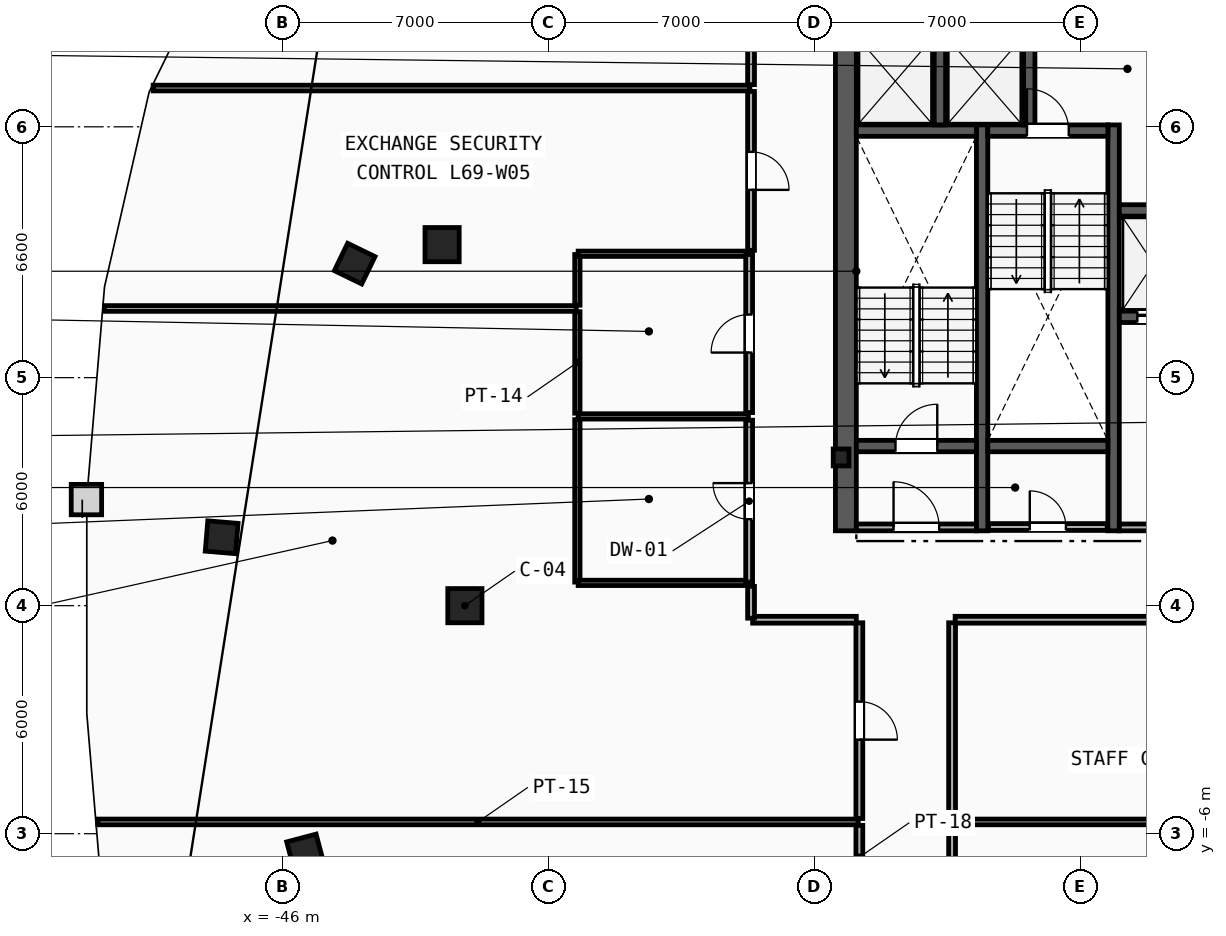
"""IFC4 building model, lengths in metres.
Left out: names, types, materials, properties, quantities, classifications, styles, units other than length and angle.
Written with IfcOpenShell. Run it as: python <this file> out.ifc"""

import sys

from ifc_helpers import new_model, si_unit, direction, frame, frame_2d, origin, origin_2d, place, context, subcontext, project, spatial, rectangle, i_section, extrude, element, fill, save


model = new_model("IFC4")
c1 = context("Model", 3, precision=1e-05, world=origin(), true_north=direction((0.0, 1.0)))
c2 = subcontext(c1, "Body", "Model", "MODEL_VIEW")
j1 = project(units=[si_unit("LENGTHUNIT", "METRE"), si_unit("PLANEANGLEUNIT", "RADIAN")], contexts=[c1])
p1 = place(None, origin())
s1 = spatial("IfcSite", under=j1, at=p1, CompositionType="ELEMENT")
p2 = place(p1, origin())
s2 = spatial("IfcBuilding", under=s1, at=p2, CompositionType="ELEMENT")
p3 = place(p2, frame((0.0, 0.0, 261.2)))
s3 = spatial("IfcBuildingStorey", under=s2, at=p3, CompositionType="ELEMENT", Elevation=261.2)
p4 = place(p3, frame((-31.3, 3.9, 0.0), z_axis=(0.0, 0.0, 1.0), x_axis=(1.0, 0.0, 0.0)))
e1 = element("IfcColumn", 1, at=p4, inside=s3, PredefinedType="COLUMN", context=c2, shape_type="SweptSolid", body=[
    extrude(i_section(OverallWidth=0.416, OverallDepth=0.446, WebThickness=0.039, FlangeThickness=0.063, FilletRadius=0.018, at=origin_2d()), origin(), (0.0, 0.0, 1.0), 3.6),
])
for number, where, z_axis, x_axis in (
    (2, (-41.2, 0.0, 0.0), (0.0, 0.0, 1.0), (1.0, 0.0, 0.0)),
    (3, (-41.8, 9.5, 0.0), (0.0, 0.0, 1.0), (1.0, 0.0, 0.0)),
):
    element("IfcColumn", number, at=place(p3, frame(where, z_axis=z_axis, x_axis=x_axis)), inside=s3, PredefinedType="COLUMN", context=c2, shape_type="SweptSolid", body=[
        extrude(rectangle(XDim=0.9, YDim=0.9, at=origin_2d()), origin(), (0.0, 0.0, 1.0), 3.6),
    ])
for number, where, z_axis, x_axis in (
    (4, (-44.1, 9.0, 0.0), (0.0, 0.0, 1.0), (-0.437, -0.899, 0.0)),
    (5, (-47.6, 1.8, 0.0), (0.0, 0.0, 1.0), (-0.084, -0.997, 0.0)),
    (6, (-45.4, -6.5, 0.0), (0.0, 0.0, 1.0), (0.256, -0.967, 0.0)),
):
    element("IfcColumn", number, at=place(p3, frame(where, z_axis=z_axis, x_axis=x_axis)), inside=s3, PredefinedType="COLUMN", context=c2, shape_type="SweptSolid", body=[
        extrude(rectangle(XDim=0.8, YDim=0.8, at=origin_2d()), origin(), (0.0, 0.0, 1.0), 3.6),
    ])
p5 = place(p3, frame((-31.175, 1.97, 0.0), z_axis=(0.0, 0.0, 1.0), x_axis=(0.0, 1.0, 0.0)))
e7 = element("IfcWall", 7, at=p5, inside=s3, PredefinedType="SHEAR", context=c2, shape_type="SweptSolid", body=[
    extrude(rectangle(XDim=13.33, YDim=0.55, at=frame_2d((6.665, 0.0))), origin(), (0.0, 0.0, 1.0), 3.34),
])
for number, where, z_axis, x_axis in (
    (8, (-27.59, 1.97, 0.0), (0.0, 0.0, 1.0), (0.0, 1.0, 0.0)),
    (9, (-24.13, 1.97, 0.0), (0.0, 0.0, 1.0), (0.0, 1.0, 0.0)),
):
    element("IfcWall", number, at=place(p3, frame(where, z_axis=z_axis, x_axis=x_axis)), inside=s3, PredefinedType="SHEAR", context=c2, shape_type="SweptSolid", body=[
        extrude(rectangle(XDim=10.68, YDim=0.3, at=frame_2d((5.34, 0.0))), origin(), (0.0, 0.0, 1.0), 3.34),
    ])
p6 = place(p3, frame((-30.9, 4.2, 0.0), z_axis=(0.0, 0.0, 1.0), x_axis=(1.0, 0.0, 0.0)))
e10 = element("IfcWall", 10, at=p6, inside=s3, PredefinedType="SHEAR", context=c2, shape_type="SweptSolid", body=[
    extrude(rectangle(XDim=3.16, YDim=0.3, at=frame_2d((1.58, 0.0))), origin(), (0.0, 0.0, 1.0), 3.34),
])
p7 = place(p6, frame((1.03, 0.0, 0.0)))
e11 = element("IfcOpeningElement", 11, at=p7, cuts=e10, PredefinedType="OPENING", context=c2, shape_type="SweptSolid", body=[
    extrude(rectangle(XDim=1.1, YDim=2.15, at=frame_2d((0.55, 1.075))), frame((0.0, 0.16, 0.0), z_axis=(0.0, -1.0, 0.0), x_axis=(1.0, 0.0, 0.0)), (0.0, 0.0, 1.0), 0.32),
])
p8 = place(p3, frame((-30.9, 12.5, 0.0), z_axis=(0.0, 0.0, 1.0), x_axis=(1.0, 0.0, 0.0)))
e12 = element("IfcWall", 12, at=p8, inside=s3, PredefinedType="SHEAR", context=c2, shape_type="SweptSolid", body=[
    extrude(rectangle(XDim=3.16, YDim=0.3, at=frame_2d((1.58, 0.0))), origin(), (0.0, 0.0, 1.0), 3.34),
])
p9 = place(p3, frame((-27.44, 12.5, 0.0), z_axis=(0.0, 0.0, 1.0), x_axis=(1.0, 0.0, 0.0)))
e13 = element("IfcWall", 13, at=p9, inside=s3, PredefinedType="SHEAR", context=c2, shape_type="SweptSolid", body=[
    extrude(rectangle(XDim=3.16, YDim=0.3, at=frame_2d((1.58, 0.0))), origin(), (0.0, 0.0, 1.0), 3.34),
])
p10 = place(p9, frame((1.03, 0.0, 0.0)))
e14 = element("IfcOpeningElement", 14, at=p10, cuts=e13, PredefinedType="OPENING", context=c2, shape_type="SweptSolid", body=[
    extrude(rectangle(XDim=1.1, YDim=2.15, at=frame_2d((0.55, 1.075))), frame((0.0, 0.16, 0.0), z_axis=(0.0, -1.0, 0.0), x_axis=(1.0, 0.0, 0.0)), (0.0, 0.0, 1.0), 0.32),
])
p11 = place(p3, frame((-27.44, 4.2, 0.0), z_axis=(0.0, 0.0, 1.0), x_axis=(1.0, 0.0, 0.0)))
e15 = element("IfcWall", 15, at=p11, inside=s3, PredefinedType="SHEAR", context=c2, shape_type="SweptSolid", body=[
    extrude(rectangle(XDim=3.16, YDim=0.3, at=frame_2d((1.58, 0.0))), origin(), (0.0, 0.0, 1.0), 3.34),
])
p12 = place(p3, frame((-23.98, 2.06, 0.0), z_axis=(0.0, 0.0, 1.0), x_axis=(1.0, 0.0, 0.0)))
e16 = element("IfcWall", 16, at=p12, inside=s3, PredefinedType="PARTITIONING", context=c2, shape_type="SweptSolid", body=[
    extrude(rectangle(XDim=3.0, YDim=0.18, at=frame_2d((1.5, 0.0))), origin(), (0.0, 0.0, 1.0), 3.34),
])
p13 = place(p12, frame((0.9, 0.0, 0.0)))
e17 = element("IfcOpeningElement", 17, at=p13, cuts=e16, PredefinedType="OPENING", context=c2, shape_type="SweptSolid", body=[
    extrude(rectangle(XDim=1.2, YDim=2.15, at=frame_2d((0.6, 1.075))), frame((0.0, 0.1, 0.0), z_axis=(0.0, -1.0, 0.0), x_axis=(1.0, 0.0, 0.0)), (0.0, 0.0, 1.0), 0.2),
])
p14 = place(p3, frame((-30.9, 2.06, 0.0), z_axis=(0.0, 0.0, 1.0), x_axis=(1.0, 0.0, 0.0)))
e18 = element("IfcWall", 18, at=p14, inside=s3, PredefinedType="PARTITIONING", context=c2, shape_type="SweptSolid", body=[
    extrude(rectangle(XDim=3.16, YDim=0.18, at=frame_2d((1.58, 0.0))), origin(), (0.0, 0.0, 1.0), 3.34),
])
p15 = place(p14, frame((0.98, 0.0, 0.0)))
e19 = element("IfcOpeningElement", 19, at=p15, cuts=e18, PredefinedType="OPENING", context=c2, shape_type="SweptSolid", body=[
    extrude(rectangle(XDim=1.2, YDim=2.15, at=frame_2d((0.6, 1.075))), frame((0.0, 0.1, 0.0), z_axis=(0.0, -1.0, 0.0), x_axis=(1.0, 0.0, 0.0)), (0.0, 0.0, 1.0), 0.2),
])
p16 = place(p3, frame((-23.98, 7.6, 0.0), z_axis=(0.0, 0.0, 1.0), x_axis=(1.0, 0.0, 0.0)))
e20 = element("IfcWall", 20, at=p16, inside=s3, PredefinedType="SHEAR", context=c2, shape_type="SweptSolid", body=[
    extrude(rectangle(XDim=2.1, YDim=0.3, at=frame_2d((1.05, 0.0))), origin(), (0.0, 0.0, 1.0), 3.34),
])
p17 = place(p16, frame((0.475, 0.0, 0.0)))
e21 = element("IfcOpeningElement", 21, at=p17, cuts=e20, PredefinedType="OPENING", context=c2, shape_type="SweptSolid", body=[
    extrude(rectangle(XDim=1.15, YDim=2.2, at=frame_2d((0.575, 1.1))), frame((0.0, 0.16, 0.0), z_axis=(0.0, -1.0, 0.0), x_axis=(1.0, 0.0, 0.0)), (0.0, 0.0, 1.0), 0.32),
])
p18 = place(p3, frame((-23.98, 10.4, 0.0), z_axis=(0.0, 0.0, 1.0), x_axis=(1.0, 0.0, 0.0)))
e22 = element("IfcWall", 22, at=p18, inside=s3, PredefinedType="SHEAR", context=c2, shape_type="SweptSolid", body=[
    extrude(rectangle(XDim=2.1, YDim=0.3, at=frame_2d((1.05, 0.0))), origin(), (0.0, 0.0, 1.0), 3.34),
])
for number, where, z_axis, x_axis in (
    (23, (-28.7, 12.65, 0.0), (0.0, 0.0, 1.0), (0.0, 1.0, 0.0)),
    (24, (-26.35, 12.65, 0.0), (0.0, 0.0, 1.0), (0.0, 1.0, 0.0)),
):
    element("IfcWall", number, at=place(p3, frame(where, z_axis=z_axis, x_axis=x_axis)), inside=s3, PredefinedType="SHEAR", context=c2, shape_type="SweptSolid", body=[
        extrude(rectangle(XDim=2.3, YDim=0.3, at=frame_2d((1.15, 0.0))), origin(), (0.0, 0.0, 1.0), 3.34),
    ])
p19 = place(p3, frame((-27.42, 2.07, 0.0), z_axis=(0.0, 0.0, 1.0), x_axis=(1.0, 0.0, 0.0)))
e25 = element("IfcWall", 25, at=p19, inside=s3, PredefinedType="PARTITIONING", context=c2, shape_type="SweptSolid", body=[
    extrude(rectangle(XDim=3.12, YDim=0.18, at=frame_2d((1.56, 0.0))), origin(), (0.0, 0.0, 1.0), 3.34),
])
p20 = place(p19, frame((1.085, 0.0, 0.0)))
e26 = element("IfcOpeningElement", 26, at=p20, cuts=e25, PredefinedType="OPENING", context=c2, shape_type="SweptSolid", body=[
    extrude(rectangle(XDim=0.95, YDim=2.1, at=frame_2d((0.475, 1.05))), frame((0.0, 0.1, 0.0), z_axis=(0.0, -1.0, 0.0), x_axis=(1.0, 0.0, 0.0)), (0.0, 0.0, 1.0), 0.2),
])
p21 = place(p3, frame((-38.24, 0.62, 0.0), z_axis=(0.0, 0.0, 1.0), x_axis=(0.0, 1.0, 0.0)))
e27 = element("IfcWall", 27, at=p21, inside=s3, PredefinedType="PARTITIONING", context=c2, shape_type="SweptSolid", body=[
    extrude(rectangle(XDim=4.275, YDim=0.14, at=frame_2d((2.137, 0.0))), origin(), (0.0, 0.0, 1.0), 3.34),
])
p22 = place(p3, frame((-38.24, 5.065, 0.0), z_axis=(0.0, 0.0, 1.0), x_axis=(0.0, 1.0, 0.0)))
e28 = element("IfcWall", 28, at=p22, inside=s3, PredefinedType="PARTITIONING", context=c2, shape_type="SweptSolid", body=[
    extrude(rectangle(XDim=2.67, YDim=0.14, at=frame_2d((1.335, 0.0))), origin(), (0.0, 0.0, 1.0), 3.34),
])
p23 = place(p3, frame((-38.24, 7.905, 0.0), z_axis=(0.0, 0.0, 1.0), x_axis=(0.0, 1.0, 0.0)))
e29 = element("IfcWall", 29, at=p23, inside=s3, PredefinedType="PARTITIONING", context=c2, shape_type="SweptSolid", body=[
    extrude(rectangle(XDim=1.335, YDim=0.14, at=frame_2d((0.667, 0.0))), origin(), (0.0, 0.0, 1.0), 3.34),
])
for number, where, z_axis, x_axis in (
    (30, (-38.22, 0.6, 0.0), (0.0, 0.0, 1.0), (1.0, 0.0, 0.0)),
    (31, (-38.22, 4.98, 0.0), (0.0, 0.0, 1.0), (1.0, 0.0, 0.0)),
    (32, (-38.22, 9.26, 0.0), (0.0, 0.0, 1.0), (1.0, 0.0, 0.0)),
):
    element("IfcWall", number, at=place(p3, frame(where, z_axis=z_axis, x_axis=x_axis)), inside=s3, PredefinedType="PARTITIONING", context=c2, shape_type="SweptSolid", body=[
        extrude(rectangle(XDim=4.48, YDim=0.14, at=frame_2d((2.24, 0.0))), origin(), (0.0, 0.0, 1.0), 3.34),
    ])
p24 = place(p3, frame((-33.72, 0.62, 0.0), z_axis=(0.0, 0.0, 1.0), x_axis=(0.0, 1.0, 0.0)))
e33 = element("IfcWall", 33, at=p24, inside=s3, PredefinedType="PARTITIONING", context=c2, shape_type="SweptSolid", body=[
    extrude(rectangle(XDim=4.26, YDim=0.18, at=frame_2d((2.13, 0.0))), origin(), (0.0, 0.0, 1.0), 3.34),
])
p25 = place(p24, frame((1.655, 0.0, 0.0)))
e34 = element("IfcOpeningElement", 34, at=p25, cuts=e33, PredefinedType="OPENING", context=c2, shape_type="SweptSolid", body=[
    extrude(rectangle(XDim=0.95, YDim=2.1, at=frame_2d((0.475, 1.05))), frame((0.0, 0.1, 0.0), z_axis=(0.0, -1.0, 0.0), x_axis=(1.0, 0.0, 0.0)), (0.0, 0.0, 1.0), 0.2),
])
p26 = place(p3, frame((-33.72, 5.08, 0.0), z_axis=(0.0, 0.0, 1.0), x_axis=(0.0, 1.0, 0.0)))
e35 = element("IfcWall", 35, at=p26, inside=s3, PredefinedType="PARTITIONING", context=c2, shape_type="SweptSolid", body=[
    extrude(rectangle(XDim=4.16, YDim=0.18, at=frame_2d((2.08, 0.0))), origin(), (0.0, 0.0, 1.0), 3.34),
])
p27 = place(p26, frame((1.58, 0.0, 0.0)))
e36 = element("IfcOpeningElement", 36, at=p27, cuts=e35, PredefinedType="OPENING", context=c2, shape_type="SweptSolid", body=[
    extrude(rectangle(XDim=1.0, YDim=2.15, at=frame_2d((0.5, 1.075))), frame((0.0, 0.1, 0.0), z_axis=(0.0, -1.0, 0.0), x_axis=(1.0, 0.0, 0.0)), (0.0, 0.0, 1.0), 0.2),
])
p28 = place(p3, frame((-50.86, -5.69, 0.0), z_axis=(0.0, 0.0, 1.0), x_axis=(1.0, 0.0, 0.0)))
e37 = element("IfcWall", 37, at=p28, inside=s3, PredefinedType="PARTITIONING", context=c2, shape_type="SweptSolid", body=[
    extrude(rectangle(XDim=20.01, YDim=0.15, at=frame_2d((10.005, 0.0))), origin(), (0.0, 0.0, 1.0), 3.34),
])
p29 = place(p3, frame((-28.35, -5.69, 0.0), z_axis=(0.0, 0.0, 1.0), x_axis=(1.0, 0.0, 0.0)))
e38 = element("IfcWall", 38, at=p29, inside=s3, PredefinedType="PARTITIONING", context=c2, shape_type="SweptSolid", body=[
    extrude(rectangle(XDim=15.21, YDim=0.15, at=frame_2d((7.605, 0.0))), origin(), (0.0, 0.0, 1.0), 3.34),
])
p30 = place(p3, frame((-50.681, 7.82, 0.0), z_axis=(0.0, 0.0, 1.0), x_axis=(1.0, 0.0, 0.0)))
e39 = element("IfcWall", 39, at=p30, inside=s3, PredefinedType="PARTITIONING", context=c2, shape_type="SweptSolid", body=[
    extrude(rectangle(XDim=12.411, YDim=0.15, at=frame_2d((6.205, 0.0))), origin(), (0.0, 0.0, 1.0), 3.34),
])
p31 = place(p3, frame((-49.404, 13.62, 0.0), z_axis=(0.0, 0.0, 1.0), x_axis=(1.0, 0.0, 0.0)))
e40 = element("IfcWall", 40, at=p31, inside=s3, PredefinedType="PARTITIONING", context=c2, shape_type="SweptSolid", body=[
    extrude(rectangle(XDim=15.704, YDim=0.15, at=frame_2d((7.852, 0.0))), origin(), (0.0, 0.0, 1.0), 3.34),
])
p32 = place(p3, frame((-30.82, -5.78, 0.0), z_axis=(0.0, 0.0, 1.0), x_axis=(0.0, -1.0, 0.0)))
e41 = element("IfcWall", 41, at=p32, inside=s3, PredefinedType="PARTITIONING", context=c2, shape_type="SweptSolid", body=[
    extrude(rectangle(XDim=6.999, YDim=0.18, at=frame_2d((3.499, 0.0))), origin(), (0.0, 0.0, 1.0), 3.34),
])
p33 = place(p32, frame((2.999, 0.0, 0.0)))
e42 = element("IfcOpeningElement", 42, at=p33, cuts=e41, PredefinedType="OPENING", context=c2, shape_type="SweptSolid", body=[
    extrude(rectangle(XDim=1.0, YDim=2.15, at=frame_2d((0.5, 1.075))), frame((0.0, 0.1, 0.0), z_axis=(0.0, -1.0, 0.0), x_axis=(1.0, 0.0, 0.0)), (0.0, 0.0, 1.0), 0.2),
])
p34 = place(p3, frame((-28.38, -12.779, 0.0), z_axis=(0.0, 0.0, 1.0), x_axis=(0.0, 1.0, 0.0)))
e43 = element("IfcWall", 43, at=p34, inside=s3, PredefinedType="PARTITIONING", context=c2, shape_type="SweptSolid", body=[
    extrude(rectangle(XDim=6.999, YDim=0.18, at=frame_2d((3.499, 0.0))), origin(), (0.0, 0.0, 1.0), 3.34),
])
p35 = place(p3, frame((-28.3, -0.37, 0.0), z_axis=(0.0, 0.0, 1.0), x_axis=(1.0, 0.0, 0.0)))
e44 = element("IfcWall", 44, at=p35, inside=s3, PredefinedType="PARTITIONING", context=c2, shape_type="SweptSolid", body=[
    extrude(rectangle(XDim=15.349, YDim=0.18, at=frame_2d((7.675, 0.0))), origin(), (0.0, 0.0, 1.0), 3.34),
])
p36 = place(p35, frame((7.175, 0.0, 0.0)))
e45 = element("IfcOpeningElement", 45, at=p36, cuts=e44, PredefinedType="OPENING", context=c2, shape_type="SweptSolid", body=[
    extrude(rectangle(XDim=1.0, YDim=2.15, at=frame_2d((0.5, 1.075))), frame((0.0, 0.1, 0.0), z_axis=(0.0, -1.0, 0.0), x_axis=(1.0, 0.0, 0.0)), (0.0, 0.0, 1.0), 0.2),
])
p37 = place(p3, frame((-28.38, -5.6, 0.0), z_axis=(0.0, 0.0, 1.0), x_axis=(0.0, 1.0, 0.0)))
e46 = element("IfcWall", 46, at=p37, inside=s3, PredefinedType="PARTITIONING", context=c2, shape_type="SweptSolid", body=[
    extrude(rectangle(XDim=5.15, YDim=0.18, at=frame_2d((2.575, 0.0))), origin(), (0.0, 0.0, 1.0), 3.34),
])
p38 = place(p3, frame((-30.82, -0.45, 0.0), z_axis=(0.0, 0.0, 1.0), x_axis=(0.0, -1.0, 0.0)))
e47 = element("IfcWall", 47, at=p38, inside=s3, PredefinedType="PARTITIONING", context=c2, shape_type="SweptSolid", body=[
    extrude(rectangle(XDim=5.15, YDim=0.18, at=frame_2d((2.575, 0.0))), origin(), (0.0, 0.0, 1.0), 3.34),
])
p39 = place(p38, frame((2.075, 0.0, 0.0)))
e48 = element("IfcOpeningElement", 48, at=p39, cuts=e47, PredefinedType="OPENING", context=c2, shape_type="SweptSolid", body=[
    extrude(rectangle(XDim=1.0, YDim=2.15, at=frame_2d((0.5, 1.075))), frame((0.0, 0.1, 0.0), z_axis=(0.0, -1.0, 0.0), x_axis=(1.0, 0.0, 0.0)), (0.0, 0.0, 1.0), 0.2),
])
p40 = place(p3, frame((-33.628, -0.37, 0.0), z_axis=(0.0, 0.0, 1.0), x_axis=(1.0, 0.0, 0.0)))
e49 = element("IfcWall", 49, at=p40, inside=s3, PredefinedType="PARTITIONING", context=c2, shape_type="SweptSolid", body=[
    extrude(rectangle(XDim=2.729, YDim=0.18, at=frame_2d((1.364, 0.0))), origin(), (0.0, 0.0, 1.0), 3.34),
])
p41 = place(p3, frame((-33.67, 0.509, 0.0), z_axis=(0.0, 0.0, 1.0), x_axis=(0.0, -1.0, 0.0)))
e50 = element("IfcWall", 50, at=p41, inside=s3, PredefinedType="PARTITIONING", context=c2, shape_type="SweptSolid", body=[
    extrude(rectangle(XDim=0.837, YDim=0.18, at=frame_2d((0.418, 0.0))), origin(), (0.0, 0.0, 1.0), 3.34),
])
p42 = place(p3, frame((-33.67, 13.53, 0.0), z_axis=(0.0, 0.0, 1.0), x_axis=(0.0, -1.0, 0.0)))
e51 = element("IfcWall", 51, at=p42, inside=s3, PredefinedType="PARTITIONING", context=c2, shape_type="SweptSolid", body=[
    extrude(rectangle(XDim=4.179, YDim=0.18, at=frame_2d((2.089, 0.0))), origin(), (0.0, 0.0, 1.0), 3.34),
])
p43 = place(p42, frame((1.589, 0.0, 0.0)))
e52 = element("IfcOpeningElement", 52, at=p43, cuts=e51, PredefinedType="OPENING", context=c2, shape_type="SweptSolid", body=[
    extrude(rectangle(XDim=1.0, YDim=2.15, at=frame_2d((0.5, 1.075))), frame((0.0, 0.1, 0.0), z_axis=(0.0, -1.0, 0.0), x_axis=(1.0, 0.0, 0.0)), (0.0, 0.0, 1.0), 0.2),
])
p44 = place(p3, frame((-33.67, 17.428, 0.0), z_axis=(0.0, 0.0, 1.0), x_axis=(0.0, -1.0, 0.0)))
e53 = element("IfcWall", 53, at=p44, inside=s3, PredefinedType="PARTITIONING", context=c2, shape_type="SweptSolid", body=[
    extrude(rectangle(XDim=3.719, YDim=0.18, at=frame_2d((1.859, 0.0))), origin(), (0.0, 0.0, 1.0), 3.34),
])
p45 = place(p44, frame((1.359, 0.0, 0.0)))
e54 = element("IfcOpeningElement", 54, at=p45, cuts=e53, PredefinedType="OPENING", context=c2, shape_type="SweptSolid", body=[
    extrude(rectangle(XDim=1.0, YDim=2.15, at=frame_2d((0.5, 1.075))), frame((0.0, 0.1, 0.0), z_axis=(0.0, -1.0, 0.0), x_axis=(1.0, 0.0, 0.0)), (0.0, 0.0, 1.0), 0.2),
])
p46 = place(p7, origin())
e55 = element("IfcDoor", 55, at=p46, inside=s3, OperationType="SINGLE_SWING_RIGHT", PredefinedType="DOOR", context=c2, shape_type="SweptSolid", body=[
    extrude(rectangle(XDim=1.1, YDim=2.15, at=frame_2d((0.55, 1.075))), frame((0.0, 0.025, 0.0), z_axis=(0.0, -1.0, 0.0), x_axis=(1.0, 0.0, 0.0)), (0.0, 0.0, 1.0), 0.05),
])
fill(e11, e55)
p47 = place(p10, origin())
e56 = element("IfcDoor", 56, at=p47, inside=s3, OperationType="SINGLE_SWING_LEFT", PredefinedType="DOOR", context=c2, shape_type="SweptSolid", body=[
    extrude(rectangle(XDim=1.1, YDim=2.15, at=frame_2d((0.55, 1.075))), frame((0.0, 0.025, 0.0), z_axis=(0.0, -1.0, 0.0), x_axis=(1.0, 0.0, 0.0)), (0.0, 0.0, 1.0), 0.05),
])
fill(e14, e56)
p48 = place(p15, origin())
e57 = element("IfcDoor", 57, at=p48, inside=s3, OperationType="SINGLE_SWING_LEFT", PredefinedType="DOOR", context=c2, shape_type="SweptSolid", body=[
    extrude(rectangle(XDim=1.2, YDim=2.15, at=frame_2d((0.6, 1.075))), frame((0.0, 0.025, 0.0), z_axis=(0.0, -1.0, 0.0), x_axis=(1.0, 0.0, 0.0)), (0.0, 0.0, 1.0), 0.05),
])
fill(e19, e57)
p49 = place(p17, origin())
e58 = element("IfcDoor", 58, at=p49, inside=s3, OperationType="SLIDING_TO_LEFT", PredefinedType="TRAPDOOR", context=c2, shape_type="SweptSolid", body=[
    extrude(rectangle(XDim=1.15, YDim=2.2, at=frame_2d((0.575, 1.1))), frame((0.0, 0.025, 0.0), z_axis=(0.0, -1.0, 0.0), x_axis=(1.0, 0.0, 0.0)), (0.0, 0.0, 1.0), 0.05),
])
fill(e21, e58)
p50 = place(p39, origin())
e59 = element("IfcDoor", 59, at=p50, inside=s3, OperationType="SINGLE_SWING_RIGHT", PredefinedType="DOOR", context=c2, shape_type="SweptSolid", body=[
    extrude(rectangle(XDim=1.0, YDim=2.15, at=frame_2d((0.5, 1.075))), frame((0.0, 0.025, 0.0), z_axis=(0.0, -1.0, 0.0), x_axis=(1.0, 0.0, 0.0)), (0.0, 0.0, 1.0), 0.05),
])
fill(e48, e59)
p51 = place(p25, origin())
e60 = element("IfcDoor", 60, at=p51, inside=s3, OperationType="SINGLE_SWING_RIGHT", PredefinedType="DOOR", context=c2, shape_type="SweptSolid", body=[
    extrude(rectangle(XDim=0.95, YDim=2.1, at=frame_2d((0.475, 1.05))), frame((0.0, 0.025, 0.0), z_axis=(0.0, -1.0, 0.0), x_axis=(1.0, 0.0, 0.0)), (0.0, 0.0, 1.0), 0.05),
])
fill(e34, e60)
p52 = place(p43, origin())
e61 = element("IfcDoor", 61, at=p52, inside=s3, OperationType="SINGLE_SWING_RIGHT", PredefinedType="DOOR", context=c2, shape_type="SweptSolid", body=[
    extrude(rectangle(XDim=1.0, YDim=2.15, at=frame_2d((0.5, 1.075))), frame((0.0, 0.025, 0.0), z_axis=(0.0, -1.0, 0.0), x_axis=(1.0, 0.0, 0.0)), (0.0, 0.0, 1.0), 0.05),
])
fill(e52, e61)
p53 = place(p27, origin())
e62 = element("IfcDoor", 62, at=p53, inside=s3, OperationType="SINGLE_SWING_LEFT", PredefinedType="DOOR", context=c2, shape_type="SweptSolid", body=[
    extrude(rectangle(XDim=1.0, YDim=2.15, at=frame_2d((0.5, 1.075))), frame((0.0, 0.025, 0.0), z_axis=(0.0, -1.0, 0.0), x_axis=(1.0, 0.0, 0.0)), (0.0, 0.0, 1.0), 0.05),
])
fill(e36, e62)
p54 = place(p20, origin())
e63 = element("IfcDoor", 63, at=p54, inside=s3, OperationType="SINGLE_SWING_LEFT", PredefinedType="DOOR", context=c2, shape_type="SweptSolid", body=[
    extrude(rectangle(XDim=0.95, YDim=2.1, at=frame_2d((0.475, 1.05))), frame((0.0, 0.025, 0.0), z_axis=(0.0, -1.0, 0.0), x_axis=(1.0, 0.0, 0.0)), (0.0, 0.0, 1.0), 0.05),
])
fill(e26, e63)
save(model, sys.argv[1])
